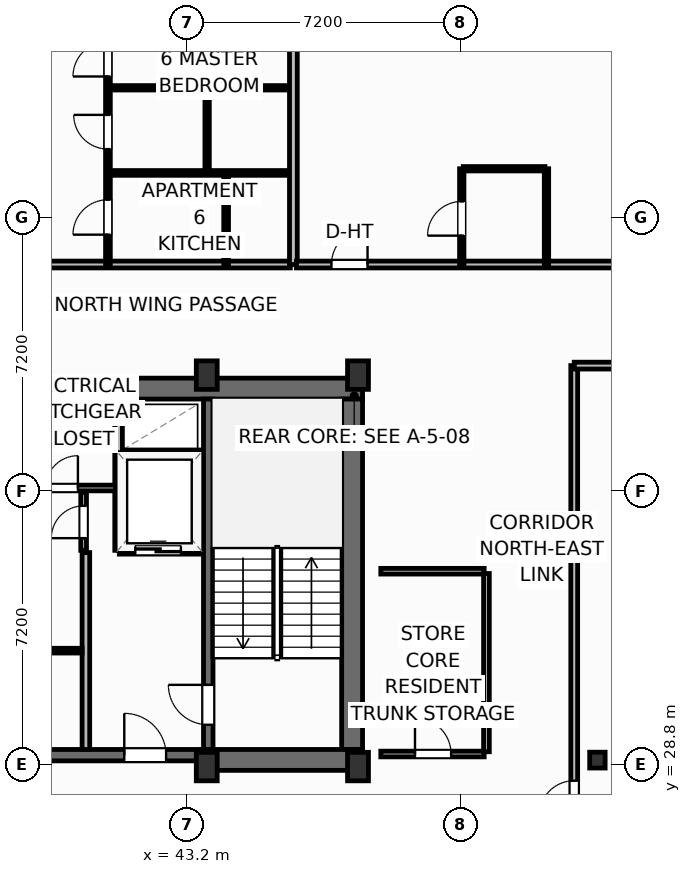
"""IFC4 building model, lengths in metres.
Left out: names, types, materials, properties, quantities, classifications, styles, units other than length and angle.
Written with IfcOpenShell. Run it as: python <this file> out.ifc"""

import sys

from ifc_helpers import new_model, si_unit, direction, frame, frame_2d, origin, origin_2d, place, context, subcontext, project, spatial, rectangle, i_section, extrude, element, fill, save


model = new_model("IFC4")
c1 = context("Model", 3, precision=1e-05, world=origin(), true_north=direction((0.0, 1.0)))
c2 = subcontext(c1, "Body", "Model", "MODEL_VIEW")
j1 = project(units=[si_unit("LENGTHUNIT", "METRE"), si_unit("PLANEANGLEUNIT", "RADIAN")], contexts=[c1])
p1 = place(None, origin())
s1 = spatial("IfcSite", under=j1, at=p1, CompositionType="ELEMENT")
p2 = place(p1, origin())
s2 = spatial("IfcBuilding", under=s1, at=p2, CompositionType="ELEMENT")
p3 = place(p2, frame((0.0, 0.0, 276.7)))
s3 = spatial("IfcBuildingStorey", under=s2, at=p3, CompositionType="ELEMENT", Elevation=276.7)
for number, where, z_axis, x_axis in (
    (1, (43.72, 28.75, 0.0), (0.0, 0.0, 1.0), (1.0, 0.0, 0.0)),
    (2, (47.7, 28.75, 0.0), (0.0, 0.0, 1.0), (1.0, 0.0, 0.0)),
    (3, (43.72, 39.05, 0.0), (0.0, 0.0, 1.0), (1.0, 0.0, 0.0)),
    (4, (47.7, 39.05, 0.0), (0.0, 0.0, 1.0), (1.0, 0.0, 0.0)),
):
    element("IfcColumn", number, at=place(p3, frame(where, z_axis=z_axis, x_axis=x_axis)), inside=s3, PredefinedType="COLUMN", context=c2, shape_type="SweptSolid", body=[
        extrude(rectangle(XDim=0.55, YDim=0.75, at=origin_2d()), origin(), (0.0, 0.0, 1.0), 3.7),
    ])
p4 = place(p3, frame((54.0, 28.92, 0.0), z_axis=(0.0, 0.0, 1.0), x_axis=(1.0, 0.0, 0.0)))
e5 = element("IfcColumn", 5, at=p4, inside=s3, PredefinedType="COLUMN", context=c2, shape_type="SweptSolid", body=[
    extrude(i_section(OverallWidth=0.406, OverallDepth=0.416, WebThickness=0.03, FlangeThickness=0.048, FilletRadius=0.025, at=origin_2d()), origin(), (0.0, 0.0, 1.0), 3.7),
])
p5 = place(p3, frame((30.58, 38.695, 0.0), z_axis=(0.0, 0.0, 1.0), x_axis=(1.0, 0.0, 0.0)))
e6 = element("IfcWall", 6, at=p5, inside=s3, PredefinedType="SHEAR", context=c2, shape_type="SweptSolid", body=[
    extrude(rectangle(XDim=17.24, YDim=0.55, at=frame_2d((8.62, 0.0))), origin(), (0.0, 0.0, 1.0), 3.45),
])
p6 = place(p3, frame((47.545, 29.2, 0.0), z_axis=(0.0, 0.0, 1.0), x_axis=(0.0, 1.0, 0.0)))
e7 = element("IfcWall", 7, at=p6, inside=s3, PredefinedType="SHEAR", context=c2, shape_type="SweptSolid", body=[
    extrude(rectangle(XDim=9.22, YDim=0.55, at=frame_2d((4.61, 0.0))), origin(), (0.0, 0.0, 1.0), 3.45),
])
p7 = place(p3, frame((43.6, 28.925, 0.0), z_axis=(0.0, 0.0, 1.0), x_axis=(1.0, 0.0, 0.0)))
e8 = element("IfcWall", 8, at=p7, inside=s3, PredefinedType="SHEAR", context=c2, shape_type="SweptSolid", body=[
    extrude(rectangle(XDim=4.22, YDim=0.55, at=frame_2d((2.11, 0.0))), origin(), (0.0, 0.0, 1.0), 3.45),
])
p8 = place(p3, frame((34.8, 29.05, 0.0), z_axis=(0.0, 0.0, 1.0), x_axis=(1.0, 0.0, 0.0)))
e9 = element("IfcWall", 9, at=p8, inside=s3, PredefinedType="SHEAR", context=c2, shape_type="SweptSolid", body=[
    extrude(rectangle(XDim=8.8, YDim=0.3, at=frame_2d((4.4, 0.0))), origin(), (0.0, 0.0, 1.0), 3.45),
])
p9 = place(p8, frame((0.95, 0.0, 0.0)))
e10 = element("IfcOpeningElement", 10, at=p9, cuts=e9, PredefinedType="OPENING", context=c2, shape_type="SweptSolid", body=[
    extrude(rectangle(XDim=1.1, YDim=2.15, at=frame_2d((0.55, 1.075))), frame((0.0, 0.16, 0.0), z_axis=(0.0, -1.0, 0.0), x_axis=(1.0, 0.0, 0.0)), (0.0, 0.0, 1.0), 0.32),
])
p10 = place(p8, frame((6.75, 0.0, 0.0)))
e11 = element("IfcOpeningElement", 11, at=p10, cuts=e9, PredefinedType="OPENING", context=c2, shape_type="SweptSolid", body=[
    extrude(rectangle(XDim=1.1, YDim=2.15, at=frame_2d((0.55, 1.075))), frame((0.0, 0.16, 0.0), z_axis=(0.0, -1.0, 0.0), x_axis=(1.0, 0.0, 0.0)), (0.0, 0.0, 1.0), 0.32),
])
p11 = place(p8, frame((3.32, 0.0, 0.0)))
e12 = element("IfcOpeningElement", 12, at=p11, cuts=e9, PredefinedType="OPENING", context=c2, shape_type="SweptSolid", body=[
    extrude(rectangle(XDim=0.95, YDim=2.15, at=frame_2d((0.475, 1.075))), frame((0.0, 0.16, 0.0), z_axis=(0.0, -1.0, 0.0), x_axis=(1.0, 0.0, 0.0)), (0.0, 0.0, 1.0), 0.32),
])
p12 = place(p3, frame((43.76, 29.2, 0.0), z_axis=(0.0, 0.0, 1.0), x_axis=(0.0, 1.0, 0.0)))
e13 = element("IfcWall", 13, at=p12, inside=s3, PredefinedType="SHEAR", context=c2, shape_type="SweptSolid", body=[
    extrude(rectangle(XDim=9.22, YDim=0.25, at=frame_2d((4.61, 0.0))), origin(), (0.0, 0.0, 1.0), 3.45),
])
p13 = place(p12, frame((0.65, 0.0, 0.0)))
e14 = element("IfcOpeningElement", 14, at=p13, cuts=e13, PredefinedType="OPENING", context=c2, shape_type="SweptSolid", body=[
    extrude(rectangle(XDim=1.05, YDim=2.15, at=frame_2d((0.525, 1.075))), frame((0.0, 0.135, 0.0), z_axis=(0.0, -1.0, 0.0), x_axis=(1.0, 0.0, 0.0)), (0.0, 0.0, 1.0), 0.27),
])
p14 = place(p3, frame((38.156, 46.912, 0.0), z_axis=(0.0, 0.0, 1.0), x_axis=(0.823527178548, 0.567276816195, 0.0)))
e15 = element("IfcWall", 15, at=p14, inside=s3, PredefinedType="SOLIDWALL", context=c2, shape_type="SweptSolid", body=[
    extrude(rectangle(XDim=5.567, YDim=0.22, at=frame_2d((2.783, 0.0))), origin(), (0.0, 0.0, 1.0), 2.73),
])
p15 = place(p14, frame((0.4, 0.0, 0.0)))
e16 = element("IfcOpeningElement", 16, at=p15, cuts=e15, PredefinedType="OPENING", context=c2, shape_type="SweptSolid", body=[
    extrude(rectangle(XDim=2.1, YDim=2.3, at=frame_2d((1.05, 1.15))), frame((0.0, 0.12, 0.0), z_axis=(0.0, -1.0, 0.0), x_axis=(1.0, 0.0, 0.0)), (0.0, 0.0, 1.0), 0.24),
])
p16 = place(p3, frame((33.08, 41.96, 0.0), z_axis=(0.0, 0.0, 1.0), x_axis=(1.0, 0.0, 0.0)))
e17 = element("IfcWall", 17, at=p16, inside=s3, PredefinedType="PARTITIONING", context=c2, shape_type="SweptSolid", body=[
    extrude(rectangle(XDim=12.84, YDim=0.18, at=frame_2d((6.42, 0.0))), origin(), (0.0, 0.0, 1.0), 3.45),
])
p17 = place(p16, frame((3.485, 0.0, 0.0)))
e18 = element("IfcOpeningElement", 18, at=p17, cuts=e17, PredefinedType="OPENING", context=c2, shape_type="SweptSolid", body=[
    extrude(rectangle(XDim=1.0, YDim=2.2, at=frame_2d((0.5, 1.1))), frame((0.0, 0.1, 0.0), z_axis=(0.0, -1.0, 0.0), x_axis=(1.0, 0.0, 0.0)), (0.0, 0.0, 1.0), 0.2),
])
p18 = place(p3, frame((41.12, 41.96, 0.0), z_axis=(0.0, 0.0, 1.0), x_axis=(0.0, 1.0, 0.0)))
e19 = element("IfcWall", 19, at=p18, inside=s3, PredefinedType="PARTITIONING", context=c2, shape_type="SweptSolid", body=[
    extrude(rectangle(XDim=6.957, YDim=0.125, at=frame_2d((3.479, 0.0))), origin(), (0.0, 0.0, 1.0), 3.45),
])
p19 = place(p18, frame((0.785, 0.0, 0.0)))
e20 = element("IfcOpeningElement", 20, at=p19, cuts=e19, PredefinedType="OPENING", context=c2, shape_type="SweptSolid", body=[
    extrude(rectangle(XDim=0.92, YDim=2.05, at=frame_2d((0.46, 1.025))), frame((0.0, 0.073, 0.0), z_axis=(0.0, -1.0, 0.0), x_axis=(1.0, 0.0, 0.0)), (0.0, 0.0, 1.0), 0.145),
])
p20 = place(p18, frame((3.037, 0.0, 0.0)))
e21 = element("IfcOpeningElement", 21, at=p20, cuts=e19, PredefinedType="OPENING", context=c2, shape_type="SweptSolid", body=[
    extrude(rectangle(XDim=0.9, YDim=2.05, at=frame_2d((0.45, 1.025))), frame((0.0, 0.073, 0.0), z_axis=(0.0, -1.0, 0.0), x_axis=(1.0, 0.0, 0.0)), (0.0, 0.0, 1.0), 0.145),
])
p21 = place(p18, frame((4.948, 0.0, 0.0)))
e22 = element("IfcOpeningElement", 22, at=p21, cuts=e19, PredefinedType="OPENING", context=c2, shape_type="SweptSolid", body=[
    extrude(rectangle(XDim=0.92, YDim=2.05, at=frame_2d((0.46, 1.025))), frame((0.0, 0.073, 0.0), z_axis=(0.0, -1.0, 0.0), x_axis=(1.0, 0.0, 0.0)), (0.0, 0.0, 1.0), 0.145),
])
p22 = place(p3, frame((41.19, 44.37, 0.0), z_axis=(0.0, 0.0, 1.0), x_axis=(1.0, 0.0, 0.0)))
e23 = element("IfcWall", 23, at=p22, inside=s3, PredefinedType="PARTITIONING", context=c2, shape_type="SweptSolid", body=[
    extrude(rectangle(XDim=4.73, YDim=0.125, at=frame_2d((2.365, 0.0))), origin(), (0.0, 0.0, 1.0), 3.45),
])
p23 = place(p3, frame((41.19, 46.61, 0.0), z_axis=(0.0, 0.0, 1.0), x_axis=(1.0, 0.0, 0.0)))
e24 = element("IfcWall", 24, at=p23, inside=s3, PredefinedType="PARTITIONING", context=c2, shape_type="SweptSolid", body=[
    extrude(rectangle(XDim=4.73, YDim=0.115, at=frame_2d((2.365, 0.0))), origin(), (0.0, 0.0, 1.0), 3.45),
])
p24 = place(p3, frame((44.23, 41.96, 0.0), z_axis=(0.0, 0.0, 1.0), x_axis=(0.0, 1.0, 0.0)))
e25 = element("IfcWall", 25, at=p24, inside=s3, PredefinedType="PARTITIONING", context=c2, shape_type="SweptSolid", body=[
    extrude(rectangle(XDim=2.41, YDim=0.125, at=frame_2d((1.205, 0.0))), origin(), (0.0, 0.0, 1.0), 3.45),
])
p25 = place(p3, frame((43.73, 44.37, 0.0), z_axis=(0.0, 0.0, 1.0), x_axis=(0.0, 1.0, 0.0)))
e26 = element("IfcWall", 26, at=p25, inside=s3, PredefinedType="PARTITIONING", context=c2, shape_type="SweptSolid", body=[
    extrude(rectangle(XDim=2.24, YDim=0.115, at=frame_2d((1.12, 0.0))), origin(), (0.0, 0.0, 1.0), 3.45),
])
p26 = place(p3, frame((46.0, 41.96, 0.0), z_axis=(0.0, 0.0, 1.0), x_axis=(0.0, 1.0, 0.0)))
e27 = element("IfcWall", 27, at=p26, inside=s3, PredefinedType="PARTITIONING", context=c2, shape_type="SweptSolid", body=[
    extrude(rectangle(XDim=12.868, YDim=0.205, at=frame_2d((6.434, 0.0))), origin(), (0.0, 0.0, 1.0), 3.45),
])
p27 = place(p3, frame((46.08, 41.96, 0.0), z_axis=(0.0, 0.0, 1.0), x_axis=(1.0, 0.0, 0.0)))
e28 = element("IfcWall", 28, at=p27, inside=s3, PredefinedType="PARTITIONING", context=c2, shape_type="SweptSolid", body=[
    extrude(rectangle(XDim=21.627, YDim=0.18, at=frame_2d((10.813, 0.0))), origin(), (0.0, 0.0, 1.0), 3.45),
])
p28 = place(p27, frame((0.921, 0.0, 0.0)))
e29 = element("IfcOpeningElement", 29, at=p28, cuts=e28, PredefinedType="OPENING", context=c2, shape_type="SweptSolid", body=[
    extrude(rectangle(XDim=0.95, YDim=2.15, at=frame_2d((0.475, 1.075))), frame((0.0, 0.1, 0.0), z_axis=(0.0, -1.0, 0.0), x_axis=(1.0, 0.0, 0.0)), (0.0, 0.0, 1.0), 0.2),
])
p29 = place(p3, frame((50.47, 44.48, 0.0), z_axis=(0.0, 0.0, 1.0), x_axis=(1.0, 0.0, 0.0)))
e30 = element("IfcWall", 30, at=p29, inside=s3, PredefinedType="PARTITIONING", context=c2, shape_type="SweptSolid", body=[
    extrude(rectangle(XDim=2.15, YDim=0.115, at=frame_2d((1.075, 0.0))), origin(), (0.0, 0.0, 1.0), 3.45),
])
p30 = place(p3, frame((50.43, 41.96, 0.0), z_axis=(0.0, 0.0, 1.0), x_axis=(0.0, 1.0, 0.0)))
e31 = element("IfcWall", 31, at=p30, inside=s3, PredefinedType="PARTITIONING", context=c2, shape_type="SweptSolid", body=[
    extrude(rectangle(XDim=2.52, YDim=0.115, at=frame_2d((1.26, 0.0))), origin(), (0.0, 0.0, 1.0), 3.45),
])
p31 = place(p30, frame((0.76, 0.0, 0.0)))
e32 = element("IfcOpeningElement", 32, at=p31, cuts=e31, PredefinedType="OPENING", context=c2, shape_type="SweptSolid", body=[
    extrude(rectangle(XDim=0.9, YDim=2.05, at=frame_2d((0.45, 1.025))), frame((0.0, 0.067, 0.0), z_axis=(0.0, -1.0, 0.0), x_axis=(1.0, 0.0, 0.0)), (0.0, 0.0, 1.0), 0.135),
])
p32 = place(p3, frame((52.66, 41.96, 0.0), z_axis=(0.0, 0.0, 1.0), x_axis=(0.0, 1.0, 0.0)))
e33 = element("IfcWall", 33, at=p32, inside=s3, PredefinedType="PARTITIONING", context=c2, shape_type="SweptSolid", body=[
    extrude(rectangle(XDim=2.52, YDim=0.115, at=frame_2d((1.26, 0.0))), origin(), (0.0, 0.0, 1.0), 3.45),
])
p33 = place(p3, frame((53.39, 26.84, 0.0), z_axis=(0.0, 0.0, 1.0), x_axis=(0.0, 1.0, 0.0)))
e34 = element("IfcWall", 34, at=p33, inside=s3, PredefinedType="PARTITIONING", context=c2, shape_type="SweptSolid", body=[
    extrude(rectangle(XDim=12.46, YDim=0.18, at=frame_2d((6.23, 0.0))), origin(), (0.0, 0.0, 1.0), 3.45),
])
p34 = place(p33, frame((0.618, 0.0, 0.0)))
e35 = element("IfcOpeningElement", 35, at=p34, cuts=e34, PredefinedType="OPENING", context=c2, shape_type="SweptSolid", body=[
    extrude(rectangle(XDim=0.92, YDim=2.05, at=frame_2d((0.46, 1.025))), frame((0.0, 0.1, 0.0), z_axis=(0.0, -1.0, 0.0), x_axis=(1.0, 0.0, 0.0)), (0.0, 0.0, 1.0), 0.2),
])
p35 = place(p3, frame((53.39, 39.3, 0.0), z_axis=(0.0, 0.0, 1.0), x_axis=(1.0, 0.0, 0.0)))
e36 = element("IfcWall", 36, at=p35, inside=s3, PredefinedType="PARTITIONING", context=c2, shape_type="SweptSolid", body=[
    extrude(rectangle(XDim=16.149, YDim=0.18, at=frame_2d((8.075, 0.0))), origin(), (0.0, 0.0, 1.0), 2.739),
])
p36 = place(p3, frame((40.54, 29.2, 0.0), z_axis=(0.0, 0.0, 1.0), x_axis=(0.0, 1.0, 0.0)))
e37 = element("IfcWall", 37, at=p36, inside=s3, PredefinedType="PARTITIONING", context=c2, shape_type="SweptSolid", body=[
    extrude(rectangle(XDim=5.18, YDim=0.2, at=frame_2d((2.59, 0.0))), origin(), (0.0, 0.0, 1.0), 3.45),
])
p37 = place(p3, frame((41.42, 34.44, 0.0), z_axis=(0.0, 0.0, 1.0), x_axis=(1.0, 0.0, 0.0)))
e38 = element("IfcWall", 38, at=p37, inside=s3, PredefinedType="PARTITIONING", context=c2, shape_type="SweptSolid", body=[
    extrude(rectangle(XDim=2.18, YDim=0.2, at=frame_2d((1.09, 0.0))), origin(), (0.0, 0.0, 1.0), 3.45),
])
p38 = place(p37, frame((0.42, 0.0, 0.0)))
e39 = element("IfcOpeningElement", 39, at=p38, cuts=e38, PredefinedType="OPENING", context=c2, shape_type="SweptSolid", body=[
    extrude(rectangle(XDim=1.2, YDim=2.2, at=frame_2d((0.6, 1.1))), frame((0.0, 0.11, 0.0), z_axis=(0.0, -1.0, 0.0), x_axis=(1.0, 0.0, 0.0)), (0.0, 0.0, 1.0), 0.22),
])
p39 = place(p3, frame((41.42, 36.98, 0.0), z_axis=(0.0, 0.0, 1.0), x_axis=(1.0, 0.0, 0.0)))
e40 = element("IfcWall", 40, at=p39, inside=s3, PredefinedType="PARTITIONING", context=c2, shape_type="SweptSolid", body=[
    extrude(rectangle(XDim=2.18, YDim=0.2, at=frame_2d((1.09, 0.0))), origin(), (0.0, 0.0, 1.0), 3.45),
])
p40 = place(p3, frame((41.4, 34.44, 0.0), z_axis=(0.0, 0.0, 1.0), x_axis=(0.0, 1.0, 0.0)))
e41 = element("IfcWall", 41, at=p40, inside=s3, PredefinedType="PARTITIONING", context=c2, shape_type="SweptSolid", body=[
    extrude(rectangle(XDim=3.9, YDim=0.2, at=frame_2d((1.95, 0.0))), origin(), (0.0, 0.0, 1.0), 3.45),
])
p41 = place(p3, frame((39.3, 36.08, 0.0), z_axis=(0.0, 0.0, 1.0), x_axis=(1.0, 0.0, 0.0)))
e42 = element("IfcWall", 42, at=p41, inside=s3, PredefinedType="PARTITIONING", context=c2, shape_type="SweptSolid", body=[
    extrude(rectangle(XDim=2.02, YDim=0.15, at=frame_2d((1.01, 0.0))), origin(), (0.0, 0.0, 1.0), 3.45),
])
p42 = place(p41, frame((0.18, 0.0, 0.0)))
e43 = element("IfcOpeningElement", 43, at=p42, cuts=e42, PredefinedType="OPENING", context=c2, shape_type="SweptSolid", body=[
    extrude(rectangle(XDim=0.85, YDim=2.05, at=frame_2d((0.425, 1.025))), frame((0.0, 0.085, 0.0), z_axis=(0.0, -1.0, 0.0), x_axis=(1.0, 0.0, 0.0)), (0.0, 0.0, 1.0), 0.17),
])
p43 = place(p3, frame((40.48, 34.44, 0.0), z_axis=(0.0, 0.0, 1.0), x_axis=(0.0, 1.0, 0.0)))
e44 = element("IfcWall", 44, at=p43, inside=s3, PredefinedType="PARTITIONING", context=c2, shape_type="SweptSolid", body=[
    extrude(rectangle(XDim=1.52, YDim=0.15, at=frame_2d((0.76, 0.0))), origin(), (0.0, 0.0, 1.0), 3.45),
])
p44 = place(p43, frame((0.32, 0.0, 0.0)))
e45 = element("IfcOpeningElement", 45, at=p44, cuts=e44, PredefinedType="OPENING", context=c2, shape_type="SweptSolid", body=[
    extrude(rectangle(XDim=0.85, YDim=2.05, at=frame_2d((0.425, 1.025))), frame((0.0, 0.085, 0.0), z_axis=(0.0, -1.0, 0.0), x_axis=(1.0, 0.0, 0.0)), (0.0, 0.0, 1.0), 0.17),
])
p45 = place(p3, frame((39.35, 31.8, 0.0), z_axis=(0.0, 0.0, 1.0), x_axis=(1.0, 0.0, 0.0)))
e46 = element("IfcWall", 46, at=p45, inside=s3, PredefinedType="PARTITIONING", context=c2, shape_type="SweptSolid", body=[
    extrude(rectangle(XDim=1.09, YDim=0.125, at=frame_2d((0.545, 0.0))), origin(), (0.0, 0.0, 1.0), 3.45),
])
p46 = place(p3, frame((48.3, 29.08, 0.0), z_axis=(0.0, 0.0, 1.0), x_axis=(1.0, 0.0, 0.0)))
e47 = element("IfcWall", 47, at=p46, inside=s3, PredefinedType="PARTITIONING", context=c2, shape_type="SweptSolid", body=[
    extrude(rectangle(XDim=2.72, YDim=0.15, at=frame_2d((1.36, 0.0))), origin(), (0.0, 0.0, 1.0), 2.662),
])
p47 = place(p46, frame((0.9, 0.0, 0.0)))
e48 = element("IfcOpeningElement", 48, at=p47, cuts=e47, PredefinedType="OPENING", context=c2, shape_type="SweptSolid", body=[
    extrude(rectangle(XDim=0.95, YDim=2.05, at=frame_2d((0.475, 1.025))), frame((0.0, 0.085, 0.0), z_axis=(0.0, -1.0, 0.0), x_axis=(1.0, 0.0, 0.0)), (0.0, 0.0, 1.0), 0.17),
])
p48 = place(p3, frame((48.3, 33.89, 0.0), z_axis=(0.0, 0.0, 1.0), x_axis=(1.0, 0.0, 0.0)))
e49 = element("IfcWall", 49, at=p48, inside=s3, PredefinedType="PARTITIONING", context=c2, shape_type="SweptSolid", body=[
    extrude(rectangle(XDim=2.72, YDim=0.15, at=frame_2d((1.36, 0.0))), origin(), (0.0, 0.0, 1.0), 3.45),
])
p49 = place(p3, frame((51.08, 29.14, 0.0), z_axis=(0.0, 0.0, 1.0), x_axis=(0.0, 1.0, 0.0)))
e50 = element("IfcWall", 50, at=p49, inside=s3, PredefinedType="PARTITIONING", context=c2, shape_type="SweptSolid", body=[
    extrude(rectangle(XDim=4.69, YDim=0.15, at=frame_2d((2.345, 0.0))), origin(), (0.0, 0.0, 1.0), 3.45),
])
p50 = place(p15, origin())
e51 = element("IfcDoor", 51, at=p50, inside=s3, OperationType="SLIDING_TO_LEFT", PredefinedType="DOOR", context=c2, shape_type="SweptSolid", body=[
    extrude(rectangle(XDim=2.1, YDim=2.3, at=frame_2d((1.05, 1.15))), frame((0.0, 0.025, 0.0), z_axis=(0.0, -1.0, 0.0), x_axis=(1.0, 0.0, 0.0)), (0.0, 0.0, 1.0), 0.05),
])
fill(e16, e51)
p51 = place(p19, origin())
e52 = element("IfcDoor", 52, at=p51, inside=s3, OperationType="SINGLE_SWING_LEFT", PredefinedType="DOOR", context=c2, shape_type="SweptSolid", body=[
    extrude(rectangle(XDim=0.92, YDim=2.05, at=frame_2d((0.46, 1.025))), frame((0.0, 0.025, 0.0), z_axis=(0.0, -1.0, 0.0), x_axis=(1.0, 0.0, 0.0)), (0.0, 0.0, 1.0), 0.05),
])
fill(e20, e52)
p52 = place(p20, origin())
e53 = element("IfcDoor", 53, at=p52, inside=s3, OperationType="SINGLE_SWING_RIGHT", PredefinedType="DOOR", context=c2, shape_type="SweptSolid", body=[
    extrude(rectangle(XDim=0.9, YDim=2.05, at=frame_2d((0.45, 1.025))), frame((0.0, 0.025, 0.0), z_axis=(0.0, -1.0, 0.0), x_axis=(1.0, 0.0, 0.0)), (0.0, 0.0, 1.0), 0.05),
])
fill(e21, e53)
p53 = place(p21, origin())
e54 = element("IfcDoor", 54, at=p53, inside=s3, OperationType="SINGLE_SWING_LEFT", PredefinedType="DOOR", context=c2, shape_type="SweptSolid", body=[
    extrude(rectangle(XDim=0.92, YDim=2.05, at=frame_2d((0.46, 1.025))), frame((0.0, 0.025, 0.0), z_axis=(0.0, -1.0, 0.0), x_axis=(1.0, 0.0, 0.0)), (0.0, 0.0, 1.0), 0.05),
])
fill(e22, e54)
p54 = place(p28, origin())
e55 = element("IfcDoor", 55, at=p54, inside=s3, OperationType="SINGLE_SWING_RIGHT", PredefinedType="DOOR", context=c2, shape_type="SweptSolid", body=[
    extrude(rectangle(XDim=0.95, YDim=2.15, at=frame_2d((0.475, 1.075))), frame((0.0, 0.025, 0.0), z_axis=(0.0, -1.0, 0.0), x_axis=(1.0, 0.0, 0.0)), (0.0, 0.0, 1.0), 0.05),
])
fill(e29, e55)
p55 = place(p31, origin())
e56 = element("IfcDoor", 56, at=p55, inside=s3, OperationType="SINGLE_SWING_LEFT", PredefinedType="DOOR", context=c2, shape_type="SweptSolid", body=[
    extrude(rectangle(XDim=0.9, YDim=2.05, at=frame_2d((0.45, 1.025))), frame((0.0, 0.025, 0.0), z_axis=(0.0, -1.0, 0.0), x_axis=(1.0, 0.0, 0.0)), (0.0, 0.0, 1.0), 0.05),
])
fill(e32, e56)
p56 = place(p34, origin())
e57 = element("IfcDoor", 57, at=p56, inside=s3, OperationType="SINGLE_SWING_LEFT", PredefinedType="DOOR", context=c2, shape_type="SweptSolid", body=[
    extrude(rectangle(XDim=0.92, YDim=2.05, at=frame_2d((0.46, 1.025))), frame((0.0, 0.025, 0.0), z_axis=(0.0, -1.0, 0.0), x_axis=(1.0, 0.0, 0.0)), (0.0, 0.0, 1.0), 0.05),
])
fill(e35, e57)
p57 = place(p13, origin())
e58 = element("IfcDoor", 58, at=p57, inside=s3, OperationType="SINGLE_SWING_RIGHT", PredefinedType="DOOR", context=c2, shape_type="SweptSolid", body=[
    extrude(rectangle(XDim=1.05, YDim=2.15, at=frame_2d((0.525, 1.075))), frame((0.0, 0.025, 0.0), z_axis=(0.0, -1.0, 0.0), x_axis=(1.0, 0.0, 0.0)), (0.0, 0.0, 1.0), 0.05),
])
fill(e14, e58)
p58 = place(p10, origin())
e59 = element("IfcDoor", 59, at=p58, inside=s3, OperationType="SINGLE_SWING_LEFT", PredefinedType="DOOR", context=c2, shape_type="SweptSolid", body=[
    extrude(rectangle(XDim=1.1, YDim=2.15, at=frame_2d((0.55, 1.075))), frame((0.0, 0.025, 0.0), z_axis=(0.0, -1.0, 0.0), x_axis=(1.0, 0.0, 0.0)), (0.0, 0.0, 1.0), 0.05),
])
fill(e11, e59)
p59 = place(p38, origin())
e60 = element("IfcDoor", 60, at=p59, inside=s3, OperationType="SLIDING_TO_LEFT", PredefinedType="DOOR", context=c2, shape_type="SweptSolid", body=[
    extrude(rectangle(XDim=1.2, YDim=2.2, at=frame_2d((0.6, 1.1))), frame((0.0, 0.025, 0.0), z_axis=(0.0, -1.0, 0.0), x_axis=(1.0, 0.0, 0.0)), (0.0, 0.0, 1.0), 0.05),
])
fill(e39, e60)
p60 = place(p42, origin())
e61 = element("IfcDoor", 61, at=p60, inside=s3, OperationType="SINGLE_SWING_RIGHT", PredefinedType="DOOR", context=c2, shape_type="SweptSolid", body=[
    extrude(rectangle(XDim=0.85, YDim=2.05, at=frame_2d((0.425, 1.025))), frame((0.0, 0.025, 0.0), z_axis=(0.0, -1.0, 0.0), x_axis=(1.0, 0.0, 0.0)), (0.0, 0.0, 1.0), 0.05),
])
fill(e43, e61)
p61 = place(p44, origin())
e62 = element("IfcDoor", 62, at=p61, inside=s3, OperationType="SINGLE_SWING_LEFT", PredefinedType="DOOR", context=c2, shape_type="SweptSolid", body=[
    extrude(rectangle(XDim=0.85, YDim=2.05, at=frame_2d((0.425, 1.025))), frame((0.0, 0.025, 0.0), z_axis=(0.0, -1.0, 0.0), x_axis=(1.0, 0.0, 0.0)), (0.0, 0.0, 1.0), 0.05),
])
fill(e45, e62)
p62 = place(p47, origin())
e63 = element("IfcDoor", 63, at=p62, inside=s3, OperationType="SINGLE_SWING_LEFT", PredefinedType="DOOR", context=c2, shape_type="SweptSolid", body=[
    extrude(rectangle(XDim=0.95, YDim=2.05, at=frame_2d((0.475, 1.025))), frame((0.0, 0.025, 0.0), z_axis=(0.0, -1.0, 0.0), x_axis=(1.0, 0.0, 0.0)), (0.0, 0.0, 1.0), 0.05),
])
fill(e48, e63)
save(model, sys.argv[1])
